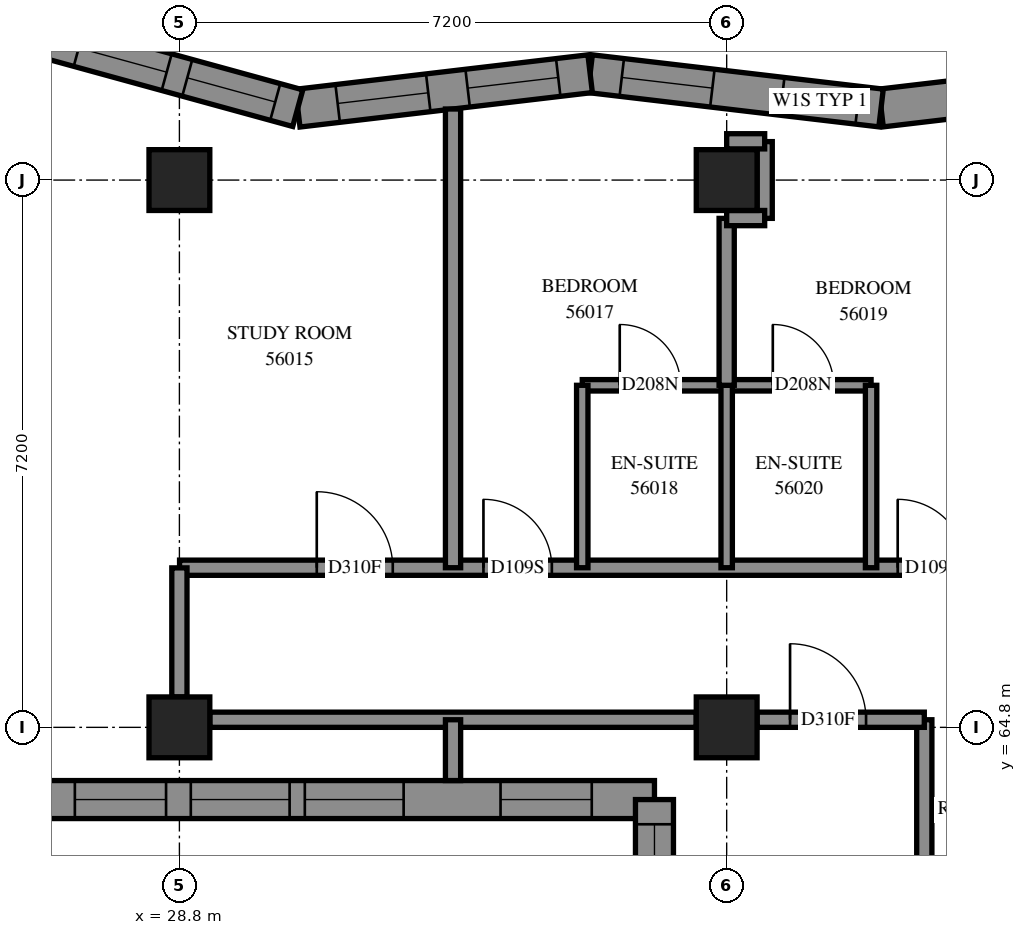
"""IFC4 building model, lengths in metres.
Left out: names, types, materials, properties, quantities, classifications, styles, units other than length and angle.
Written with IfcOpenShell. Run it as: python <this file> out.ifc"""

import sys

from ifc_helpers import new_model, si_unit, direction, frame, frame_2d, origin, origin_2d, place, context, subcontext, project, spatial, polyline, rectangle, outline, extrude, element, fill, save


model = new_model("IFC4")
c1 = context("Model", 3, precision=1e-05, world=origin(), true_north=direction((0.0, 1.0)))
c2 = subcontext(c1, "Body", "Model", "MODEL_VIEW")
j1 = project(units=[si_unit("LENGTHUNIT", "METRE"), si_unit("PLANEANGLEUNIT", "RADIAN")], contexts=[c1])
p1 = place(None, origin())
s1 = spatial("IfcSite", under=j1, at=p1, CompositionType="ELEMENT")
p2 = place(p1, origin())
s2 = spatial("IfcBuilding", under=s1, at=p2, CompositionType="ELEMENT")
p3 = place(p2, frame((0.0, 0.0, 206.6)))
s3 = spatial("IfcBuildingStorey", under=s2, at=p3, CompositionType="ELEMENT", Elevation=206.6)
for number, where, z_axis, x_axis in (
    (1, (28.8, 64.8, 0.0), (0.0, 0.0, 1.0), (1.0, 0.0, 0.0)),
    (2, (28.8, 72.0, 0.0), (0.0, 0.0, 1.0), (1.0, 0.0, 0.0)),
    (3, (36.0, 64.8, 0.0), (0.0, 0.0, 1.0), (1.0, 0.0, 0.0)),
    (4, (36.0, 72.0, 0.0), (0.0, 0.0, 1.0), (1.0, 0.0, 0.0)),
):
    element("IfcColumn", number, at=place(p3, frame(where, z_axis=z_axis, x_axis=x_axis)), inside=s3, PredefinedType="COLUMN", context=c2, shape_type="SweptSolid", body=[
        extrude(rectangle(XDim=0.8, YDim=0.8, at=origin_2d()), origin(), (0.0, 0.0, 1.0), 3.1),
    ])
p4 = place(p3, frame((41.859, 73.399, 0.0), z_axis=(0.0, 0.0, 1.0), x_axis=(-0.9931289789, -0.1170249176, 0.0)))
e5 = element("IfcWall", 5, at=p4, inside=s3, PredefinedType="SOLIDWALL", context=c2, shape_type="SweptSolid", body=[
    extrude(outline(polyline([(-0.029, -0.25), (3.824, -0.25), (3.883, 0.25), (0.029, 0.25), (-0.029, -0.25)])), origin(), (0.0, 0.0, 1.0), 3.1),
])
p5 = place(p4, frame((0.652, 0.0, 0.45)))
e6 = element("IfcOpeningElement", 6, at=p5, cuts=e5, PredefinedType="OPENING", context=c2, shape_type="SweptSolid", body=[
    extrude(rectangle(XDim=1.2, YDim=2.5, at=frame_2d((0.6, 1.25))), frame((0.0, 0.26, 0.0), z_axis=(0.0, -1.0, 0.0), x_axis=(1.0, 0.0, 0.0)), (0.0, 0.0, 1.0), 0.52),
])
p6 = place(p3, frame((38.031, 72.948, 0.0), z_axis=(0.0, 0.0, 1.0), x_axis=(-0.9931289789, 0.1170249176, 0.0)))
e7 = element("IfcWall", 7, at=p6, inside=s3, PredefinedType="SOLIDWALL", context=c2, shape_type="SweptSolid", body=[
    extrude(outline(polyline([(0.029, -0.25), (3.883, -0.25), (3.824, 0.25), (-0.029, 0.25), (0.029, -0.25)])), origin(), (0.0, 0.0, 1.0), 3.1),
])
p7 = place(p6, frame((2.235, 0.0, 0.45)))
e8 = element("IfcOpeningElement", 8, at=p7, cuts=e7, PredefinedType="OPENING", context=c2, shape_type="SweptSolid", body=[
    extrude(rectangle(XDim=1.2, YDim=2.5, at=frame_2d((0.6, 1.25))), frame((0.0, 0.26, 0.0), z_axis=(0.0, -1.0, 0.0), x_axis=(1.0, 0.0, 0.0)), (0.0, 0.0, 1.0), 0.52),
])
p8 = place(p6, frame((0.309, 0.0, 0.45)))
e9 = element("IfcOpeningElement", 9, at=p8, cuts=e7, PredefinedType="OPENING", context=c2, shape_type="SweptSolid", body=[
    extrude(rectangle(XDim=1.0, YDim=2.5, at=frame_2d((0.5, 1.25))), frame((0.0, 0.26, 0.0), z_axis=(0.0, -1.0, 0.0), x_axis=(1.0, 0.0, 0.0)), (0.0, 0.0, 1.0), 0.52),
])
p9 = place(p3, frame((34.204, 73.399, 0.0), z_axis=(0.0, 0.0, 1.0), x_axis=(-0.9931278513, -0.1170344863, 0.0)))
e10 = element("IfcWall", 10, at=p9, inside=s3, PredefinedType="SOLIDWALL", context=c2, shape_type="SweptSolid", body=[
    extrude(outline(polyline([(-0.029, -0.25), (3.824, -0.25), (3.922, 0.25), (0.029, 0.25), (-0.029, -0.25)])), origin(), (0.0, 0.0, 1.0), 3.1),
])
p10 = place(p9, frame((0.423, 0.0, 0.45)))
e11 = element("IfcOpeningElement", 11, at=p10, cuts=e10, PredefinedType="OPENING", context=c2, shape_type="SweptSolid", body=[
    extrude(rectangle(XDim=1.2, YDim=2.5, at=frame_2d((0.6, 1.25))), frame((0.0, 0.26, 0.0), z_axis=(0.0, -1.0, 0.0), x_axis=(1.0, 0.0, 0.0)), (0.0, 0.0, 1.0), 0.52),
])
p11 = place(p9, frame((2.145, 0.0, 0.45)))
e12 = element("IfcOpeningElement", 12, at=p11, cuts=e10, PredefinedType="OPENING", context=c2, shape_type="SweptSolid", body=[
    extrude(rectangle(XDim=1.2, YDim=2.5, at=frame_2d((0.6, 1.25))), frame((0.0, 0.26, 0.0), z_axis=(0.0, -1.0, 0.0), x_axis=(1.0, 0.0, 0.0)), (0.0, 0.0, 1.0), 0.52),
])
p12 = place(p3, frame((30.357, 72.946, 0.0), z_axis=(0.0, 0.0, 1.0), x_axis=(-0.9643026767, 0.2648024691, 0.0)))
e13 = element("IfcWall", 13, at=p12, inside=s3, PredefinedType="SOLIDWALL", context=c2, shape_type="SweptSolid", body=[
    extrude(outline(polyline([(0.049, -0.25), (4.018, -0.25), (3.362, 0.25), (-0.049, 0.25), (0.049, -0.25)])), origin(), (0.0, 0.0, 1.0), 3.1),
])
p13 = place(p12, frame((0.307, 0.0, 0.45)))
e14 = element("IfcOpeningElement", 14, at=p13, cuts=e13, PredefinedType="OPENING", context=c2, shape_type="SweptSolid", body=[
    extrude(rectangle(XDim=1.2, YDim=2.5, at=frame_2d((0.6, 1.25))), frame((0.0, 0.26, 0.0), z_axis=(0.0, -1.0, 0.0), x_axis=(1.0, 0.0, 0.0)), (0.0, 0.0, 1.0), 0.52),
])
p14 = place(p12, frame((1.788, 0.0, 0.45)))
e15 = element("IfcOpeningElement", 15, at=p14, cuts=e13, PredefinedType="OPENING", context=c2, shape_type="SweptSolid", body=[
    extrude(rectangle(XDim=1.2, YDim=2.5, at=frame_2d((0.6, 1.25))), frame((0.0, 0.26, 0.0), z_axis=(0.0, -1.0, 0.0), x_axis=(1.0, 0.0, 0.0)), (0.0, 0.0, 1.0), 0.52),
])
p15 = place(p3, frame((26.799, 63.85, 0.0), z_axis=(0.0, 0.0, 1.0), x_axis=(1.0, 0.0, 0.0)))
e16 = element("IfcWall", 16, at=p15, inside=s3, PredefinedType="SOLIDWALL", context=c2, shape_type="SweptSolid", body=[
    extrude(outline(polyline([(-0.25, -0.25), (8.001, -0.25), (8.501, 0.25), (0.25, 0.25), (-0.25, -0.25)])), origin(), (0.0, 0.0, 1.0), 3.1),
])
p16 = place(p15, frame((2.151, 0.0, 0.45)))
e17 = element("IfcOpeningElement", 17, at=p16, cuts=e16, PredefinedType="OPENING", context=c2, shape_type="SweptSolid", body=[
    extrude(rectangle(XDim=1.3, YDim=2.5, at=frame_2d((0.65, 1.25))), frame((0.0, 0.26, 0.0), z_axis=(0.0, -1.0, 0.0), x_axis=(1.0, 0.0, 0.0)), (0.0, 0.0, 1.0), 0.52),
])
p17 = place(p15, frame((3.651, 0.0, 0.45)))
e18 = element("IfcOpeningElement", 18, at=p17, cuts=e16, PredefinedType="OPENING", context=c2, shape_type="SweptSolid", body=[
    extrude(rectangle(XDim=1.3, YDim=2.5, at=frame_2d((0.65, 1.25))), frame((0.0, 0.26, 0.0), z_axis=(0.0, -1.0, 0.0), x_axis=(1.0, 0.0, 0.0)), (0.0, 0.0, 1.0), 0.52),
])
p18 = place(p15, frame((0.625, 0.0, 0.45)))
e19 = element("IfcOpeningElement", 19, at=p18, cuts=e16, PredefinedType="OPENING", context=c2, shape_type="SweptSolid", body=[
    extrude(rectangle(XDim=1.2, YDim=2.5, at=frame_2d((0.6, 1.25))), frame((0.0, 0.26, 0.0), z_axis=(0.0, -1.0, 0.0), x_axis=(1.0, 0.0, 0.0)), (0.0, 0.0, 1.0), 0.52),
])
p19 = place(p15, frame((6.226, 0.0, 0.45)))
e20 = element("IfcOpeningElement", 20, at=p19, cuts=e16, PredefinedType="OPENING", context=c2, shape_type="SweptSolid", body=[
    extrude(rectangle(XDim=1.2, YDim=2.5, at=frame_2d((0.6, 1.25))), frame((0.0, 0.26, 0.0), z_axis=(0.0, -1.0, 0.0), x_axis=(1.0, 0.0, 0.0)), (0.0, 0.0, 1.0), 0.52),
])
p20 = place(p3, frame((35.05, 63.85, 0.0), z_axis=(0.0, 0.0, 1.0), x_axis=(0.0, -1.0, 0.0)))
e21 = element("IfcWall", 21, at=p20, inside=s3, PredefinedType="SOLIDWALL", context=c2, shape_type="SweptSolid", body=[
    extrude(outline(polyline([(0.25, -0.25), (7.45, -0.25), (6.95, 0.25), (-0.25, 0.25), (0.25, -0.25)])), origin(), (0.0, 0.0, 1.0), 3.1),
])
p21 = place(p20, frame((2.2, 0.0, 0.45)))
e22 = element("IfcOpeningElement", 22, at=p21, cuts=e21, PredefinedType="OPENING", context=c2, shape_type="SweptSolid", body=[
    extrude(rectangle(XDim=1.3, YDim=2.5, at=frame_2d((0.65, 1.25))), frame((0.0, 0.26, 0.0), z_axis=(0.0, -1.0, 0.0), x_axis=(1.0, 0.0, 0.0)), (0.0, 0.0, 1.0), 0.52),
])
p22 = place(p20, frame((4.55, 0.0, 0.45)))
e23 = element("IfcOpeningElement", 23, at=p22, cuts=e21, PredefinedType="OPENING", context=c2, shape_type="SweptSolid", body=[
    extrude(rectangle(XDim=1.3, YDim=2.5, at=frame_2d((0.65, 1.25))), frame((0.0, 0.26, 0.0), z_axis=(0.0, -1.0, 0.0), x_axis=(1.0, 0.0, 0.0)), (0.0, 0.0, 1.0), 0.52),
])
p23 = place(p20, frame((0.325, 0.0, 0.45)))
e24 = element("IfcOpeningElement", 24, at=p23, cuts=e21, PredefinedType="OPENING", context=c2, shape_type="SweptSolid", body=[
    extrude(rectangle(XDim=1.2, YDim=2.5, at=frame_2d((0.6, 1.25))), frame((0.0, 0.26, 0.0), z_axis=(0.0, -1.0, 0.0), x_axis=(1.0, 0.0, 0.0)), (0.0, 0.0, 1.0), 0.52),
])
p24 = place(p3, frame((28.802, 66.9, 0.0), z_axis=(0.0, 0.0, 1.0), x_axis=(1.0, 0.0, 0.0)))
e25 = element("IfcWall", 25, at=p24, inside=s3, PredefinedType="PARTITIONING", context=c2, shape_type="SweptSolid", body=[
    extrude(rectangle(XDim=11.798, YDim=0.2, at=frame_2d((5.899, 0.0))), origin(), (0.0, 0.0, 1.0), 3.1),
])
p25 = place(p24, frame((1.805, 0.0, 0.0)))
e26 = element("IfcOpeningElement", 26, at=p25, cuts=e25, PredefinedType="OPENING", context=c2, shape_type="SweptSolid", body=[
    extrude(rectangle(XDim=1.0, YDim=2.1, at=frame_2d((0.5, 1.05))), frame((0.0, 0.11, 0.0), z_axis=(0.0, -1.0, 0.0), x_axis=(1.0, 0.0, 0.0)), (0.0, 0.0, 1.0), 0.22),
])
p26 = place(p24, frame((3.998, 0.0, 0.0)))
e27 = element("IfcOpeningElement", 27, at=p26, cuts=e25, PredefinedType="OPENING", context=c2, shape_type="SweptSolid", body=[
    extrude(rectangle(XDim=0.9, YDim=2.1, at=frame_2d((0.45, 1.05))), frame((0.0, 0.11, 0.0), z_axis=(0.0, -1.0, 0.0), x_axis=(1.0, 0.0, 0.0)), (0.0, 0.0, 1.0), 0.22),
])
p27 = place(p24, frame((9.448, 0.0, 0.0)))
e28 = element("IfcOpeningElement", 28, at=p27, cuts=e25, PredefinedType="OPENING", context=c2, shape_type="SweptSolid", body=[
    extrude(rectangle(XDim=0.9, YDim=2.1, at=frame_2d((0.45, 1.05))), frame((0.0, 0.11, 0.0), z_axis=(0.0, -1.0, 0.0), x_axis=(1.0, 0.0, 0.0)), (0.0, 0.0, 1.0), 0.22),
])
p28 = place(p3, frame((29.2, 64.9, 0.0), z_axis=(0.0, 0.0, 1.0), x_axis=(1.0, 0.0, 0.0)))
e29 = element("IfcWall", 29, at=p28, inside=s3, PredefinedType="PARTITIONING", context=c2, shape_type="SweptSolid", body=[
    extrude(rectangle(XDim=6.4, YDim=0.2, at=frame_2d((3.2, 0.0))), origin(), (0.0, 0.0, 1.0), 2.6),
])
p29 = place(p3, frame((32.4, 66.9, 0.0), z_axis=(0.0, 0.0, 1.0), x_axis=(0.0, 1.0, 0.0)))
e30 = element("IfcWall", 30, at=p29, inside=s3, PredefinedType="PARTITIONING", context=c2, shape_type="SweptSolid", body=[
    extrude(rectangle(XDim=6.035, YDim=0.2, at=frame_2d((3.018, 0.0))), origin(), (0.0, 0.0, 1.0), 3.1),
])
p30 = place(p3, frame((34.1, 69.3, 0.0), z_axis=(0.0, 0.0, 1.0), x_axis=(1.0, 0.0, 0.0)))
e31 = element("IfcWall", 31, at=p30, inside=s3, PredefinedType="PARTITIONING", context=c2, shape_type="SweptSolid", body=[
    extrude(rectangle(XDim=3.8, YDim=0.15, at=frame_2d((1.9, 0.0))), origin(), (0.0, 0.0, 1.0), 3.1),
])
p31 = place(p30, frame((0.493, 0.0, 0.0)))
e32 = element("IfcOpeningElement", 32, at=p31, cuts=e31, PredefinedType="OPENING", context=c2, shape_type="SweptSolid", body=[
    extrude(rectangle(XDim=0.8, YDim=2.1, at=frame_2d((0.4, 1.05))), frame((0.0, 0.085, 0.0), z_axis=(0.0, -1.0, 0.0), x_axis=(1.0, 0.0, 0.0)), (0.0, 0.0, 1.0), 0.17),
])
p32 = place(p30, frame((2.507, 0.0, 0.0)))
e33 = element("IfcOpeningElement", 33, at=p32, cuts=e31, PredefinedType="OPENING", context=c2, shape_type="SweptSolid", body=[
    extrude(rectangle(XDim=0.8, YDim=2.1, at=frame_2d((0.4, 1.05))), frame((0.0, 0.085, 0.0), z_axis=(0.0, -1.0, 0.0), x_axis=(1.0, 0.0, 0.0)), (0.0, 0.0, 1.0), 0.17),
])
p33 = place(p3, frame((38.6, 62.202, 0.0), z_axis=(0.0, 0.0, 1.0), x_axis=(0.0, 1.0, 0.0)))
e34 = element("IfcWall", 34, at=p33, inside=s3, PredefinedType="PARTITIONING", context=c2, shape_type="SweptSolid", body=[
    extrude(rectangle(XDim=2.698, YDim=0.2, at=frame_2d((1.349, 0.0))), origin(), (0.0, 0.0, 1.0), 3.1),
])
for number, where, z_axis, x_axis in (
    (35, (34.1, 66.9, 0.0), (0.0, 0.0, 1.0), (0.0, 1.0, 0.0)),
    (36, (36.0, 66.9, 0.0), (0.0, 0.0, 1.0), (0.0, 1.0, 0.0)),
    (37, (37.9, 66.9, 0.0), (0.0, 0.0, 1.0), (0.0, 1.0, 0.0)),
):
    element("IfcWall", number, at=place(p3, frame(where, z_axis=z_axis, x_axis=x_axis)), inside=s3, PredefinedType="PARTITIONING", context=c2, shape_type="SweptSolid", body=[
        extrude(rectangle(XDim=2.4, YDim=0.15, at=frame_2d((1.2, 0.0))), origin(), (0.0, 0.0, 1.0), 3.1),
    ])
p34 = place(p3, frame((36.4, 64.9, 0.0), z_axis=(0.0, 0.0, 1.0), x_axis=(1.0, 0.0, 0.0)))
e38 = element("IfcWall", 38, at=p34, inside=s3, PredefinedType="PARTITIONING", context=c2, shape_type="SweptSolid", body=[
    extrude(rectangle(XDim=2.2, YDim=0.2, at=frame_2d((1.1, 0.0))), origin(), (0.0, 0.0, 1.0), 3.1),
])
p35 = place(p34, frame((0.434, 0.0, 0.0)))
e39 = element("IfcOpeningElement", 39, at=p35, cuts=e38, PredefinedType="OPENING", context=c2, shape_type="SweptSolid", body=[
    extrude(rectangle(XDim=1.0, YDim=2.1, at=frame_2d((0.5, 1.05))), frame((0.0, 0.11, 0.0), z_axis=(0.0, -1.0, 0.0), x_axis=(1.0, 0.0, 0.0)), (0.0, 0.0, 1.0), 0.22),
])
p36 = place(p3, frame((36.0, 69.3, 0.0), z_axis=(0.0, 0.0, 1.0), x_axis=(0.0, 1.0, 0.0)))
e40 = element("IfcWall", 40, at=p36, inside=s3, PredefinedType="PARTITIONING", context=c2, shape_type="SweptSolid", body=[
    extrude(rectangle(XDim=2.196, YDim=0.2, at=frame_2d((1.098, 0.0))), origin(), (0.0, 0.0, 1.0), 3.1),
])
p37 = place(p3, frame((28.8, 65.2, 0.0), z_axis=(0.0, 0.0, 1.0), x_axis=(0.0, 1.0, 0.0)))
e41 = element("IfcWall", 41, at=p37, inside=s3, PredefinedType="PARTITIONING", context=c2, shape_type="SweptSolid", body=[
    extrude(rectangle(XDim=1.698, YDim=0.2, at=frame_2d((0.849, 0.0))), origin(), (0.0, 0.0, 1.0), 2.6),
])
p38 = place(p3, frame((36.5, 71.496, 0.0), z_axis=(0.0, 0.0, 1.0), x_axis=(0.0, 1.0, 0.0)))
e42 = element("IfcWall", 42, at=p38, inside=s3, PredefinedType="PARTITIONING", context=c2, shape_type="SweptSolid", body=[
    extrude(rectangle(XDim=1.01, YDim=0.2, at=frame_2d((0.505, 0.0))), origin(), (0.0, 0.0, 1.0), 3.1),
])
p39 = place(p3, frame((32.4, 64.1, 0.0), z_axis=(0.0, 0.0, 1.0), x_axis=(0.0, 1.0, 0.0)))
e43 = element("IfcWall", 43, at=p39, inside=s3, PredefinedType="PARTITIONING", context=c2, shape_type="SweptSolid", body=[
    extrude(rectangle(XDim=0.8, YDim=0.2, at=frame_2d((0.4, 0.0))), origin(), (0.0, 0.0, 1.0), 3.1),
])
for number, where, z_axis, x_axis in (
    (44, (36.0, 72.51, 0.0), (0.0, 0.0, 1.0), (1.0, 0.0, 0.0)),
    (45, (36.0, 71.5, 0.0), (0.0, 0.0, 1.0), (1.0, 0.0, 0.0)),
):
    element("IfcWall", number, at=place(p3, frame(where, z_axis=z_axis, x_axis=x_axis)), inside=s3, PredefinedType="PARTITIONING", context=c2, shape_type="SweptSolid", body=[
        extrude(rectangle(XDim=0.5, YDim=0.2, at=frame_2d((0.25, 0.0))), origin(), (0.0, 0.0, 1.0), 3.1),
    ])
p40 = place(p7, origin())
e46 = element("IfcWindow", 46, at=p40, inside=s3, PartitioningType="SINGLE_PANEL", PredefinedType="WINDOW", context=c2, shape_type="SweptSolid", body=[
    extrude(rectangle(XDim=1.2, YDim=2.5, at=frame_2d((0.6, 1.25))), frame((0.0, 0.18, 0.0), z_axis=(0.0, -1.0, 0.0), x_axis=(1.0, 0.0, 0.0)), (0.0, 0.0, 1.0), 0.06),
])
fill(e8, e46)
p41 = place(p10, origin())
e47 = element("IfcWindow", 47, at=p41, inside=s3, PartitioningType="SINGLE_PANEL", PredefinedType="WINDOW", context=c2, shape_type="SweptSolid", body=[
    extrude(rectangle(XDim=1.2, YDim=2.5, at=frame_2d((0.6, 1.25))), frame((0.0, 0.18, 0.0), z_axis=(0.0, -1.0, 0.0), x_axis=(1.0, 0.0, 0.0)), (0.0, 0.0, 1.0), 0.06),
])
fill(e11, e47)
p42 = place(p11, origin())
e48 = element("IfcWindow", 48, at=p42, inside=s3, PartitioningType="SINGLE_PANEL", PredefinedType="WINDOW", context=c2, shape_type="SweptSolid", body=[
    extrude(rectangle(XDim=1.2, YDim=2.5, at=frame_2d((0.6, 1.25))), frame((0.0, 0.18, 0.0), z_axis=(0.0, -1.0, 0.0), x_axis=(1.0, 0.0, 0.0)), (0.0, 0.0, 1.0), 0.06),
])
fill(e12, e48)
p43 = place(p13, origin())
e49 = element("IfcWindow", 49, at=p43, inside=s3, PartitioningType="SINGLE_PANEL", PredefinedType="WINDOW", context=c2, shape_type="SweptSolid", body=[
    extrude(rectangle(XDim=1.2, YDim=2.5, at=frame_2d((0.6, 1.25))), frame((0.0, 0.18, 0.0), z_axis=(0.0, -1.0, 0.0), x_axis=(1.0, 0.0, 0.0)), (0.0, 0.0, 1.0), 0.06),
])
fill(e14, e49)
p44 = place(p14, origin())
e50 = element("IfcWindow", 50, at=p44, inside=s3, PartitioningType="SINGLE_PANEL", PredefinedType="WINDOW", context=c2, shape_type="SweptSolid", body=[
    extrude(rectangle(XDim=1.2, YDim=2.5, at=frame_2d((0.6, 1.25))), frame((0.0, 0.18, 0.0), z_axis=(0.0, -1.0, 0.0), x_axis=(1.0, 0.0, 0.0)), (0.0, 0.0, 1.0), 0.06),
])
fill(e15, e50)
p45 = place(p16, origin())
e51 = element("IfcWindow", 51, at=p45, inside=s3, PartitioningType="SINGLE_PANEL", PredefinedType="WINDOW", context=c2, shape_type="SweptSolid", body=[
    extrude(rectangle(XDim=1.3, YDim=2.5, at=frame_2d((0.65, 1.25))), frame((0.0, 0.18, 0.0), z_axis=(0.0, -1.0, 0.0), x_axis=(1.0, 0.0, 0.0)), (0.0, 0.0, 1.0), 0.06),
])
fill(e17, e51)
p46 = place(p17, origin())
e52 = element("IfcWindow", 52, at=p46, inside=s3, PartitioningType="SINGLE_PANEL", PredefinedType="WINDOW", context=c2, shape_type="SweptSolid", body=[
    extrude(rectangle(XDim=1.3, YDim=2.5, at=frame_2d((0.65, 1.25))), frame((0.0, 0.18, 0.0), z_axis=(0.0, -1.0, 0.0), x_axis=(1.0, 0.0, 0.0)), (0.0, 0.0, 1.0), 0.06),
])
fill(e18, e52)
p47 = place(p18, origin())
e53 = element("IfcWindow", 53, at=p47, inside=s3, PartitioningType="SINGLE_PANEL", PredefinedType="WINDOW", context=c2, shape_type="SweptSolid", body=[
    extrude(rectangle(XDim=1.2, YDim=2.5, at=frame_2d((0.6, 1.25))), frame((0.0, 0.18, 0.0), z_axis=(0.0, -1.0, 0.0), x_axis=(1.0, 0.0, 0.0)), (0.0, 0.0, 1.0), 0.06),
])
fill(e19, e53)
p48 = place(p19, origin())
e54 = element("IfcWindow", 54, at=p48, inside=s3, PartitioningType="SINGLE_PANEL", PredefinedType="WINDOW", context=c2, shape_type="SweptSolid", body=[
    extrude(rectangle(XDim=1.2, YDim=2.5, at=frame_2d((0.6, 1.25))), frame((0.0, 0.18, 0.0), z_axis=(0.0, -1.0, 0.0), x_axis=(1.0, 0.0, 0.0)), (0.0, 0.0, 1.0), 0.06),
])
fill(e20, e54)
p49 = place(p23, origin())
e55 = element("IfcWindow", 55, at=p49, inside=s3, PartitioningType="SINGLE_PANEL", PredefinedType="WINDOW", context=c2, shape_type="SweptSolid", body=[
    extrude(rectangle(XDim=1.2, YDim=2.5, at=frame_2d((0.6, 1.25))), frame((0.0, 0.18, 0.0), z_axis=(0.0, -1.0, 0.0), x_axis=(1.0, 0.0, 0.0)), (0.0, 0.0, 1.0), 0.06),
])
fill(e24, e55)
p50 = place(p25, origin())
e56 = element("IfcDoor", 56, at=p50, inside=s3, OperationType="SINGLE_SWING_RIGHT", PredefinedType="DOOR", context=c2, shape_type="SweptSolid", body=[
    extrude(rectangle(XDim=1.0, YDim=2.1, at=frame_2d((0.5, 1.05))), frame((0.0, 0.025, 0.0), z_axis=(0.0, -1.0, 0.0), x_axis=(1.0, 0.0, 0.0)), (0.0, 0.0, 1.0), 0.05),
])
fill(e26, e56)
p51 = place(p35, origin())
e57 = element("IfcDoor", 57, at=p51, inside=s3, OperationType="SINGLE_SWING_RIGHT", PredefinedType="DOOR", context=c2, shape_type="SweptSolid", body=[
    extrude(rectangle(XDim=1.0, YDim=2.1, at=frame_2d((0.5, 1.05))), frame((0.0, 0.025, 0.0), z_axis=(0.0, -1.0, 0.0), x_axis=(1.0, 0.0, 0.0)), (0.0, 0.0, 1.0), 0.05),
])
fill(e39, e57)
p52 = place(p26, origin())
e58 = element("IfcDoor", 58, at=p52, inside=s3, OperationType="SINGLE_SWING_LEFT", PredefinedType="DOOR", context=c2, shape_type="SweptSolid", body=[
    extrude(rectangle(XDim=0.9, YDim=2.1, at=frame_2d((0.45, 1.05))), frame((0.0, 0.025, 0.0), z_axis=(0.0, -1.0, 0.0), x_axis=(1.0, 0.0, 0.0)), (0.0, 0.0, 1.0), 0.05),
])
fill(e27, e58)
p53 = place(p31, origin())
e59 = element("IfcDoor", 59, at=p53, inside=s3, OperationType="SINGLE_SWING_RIGHT", PredefinedType="DOOR", context=c2, shape_type="SweptSolid", body=[
    extrude(rectangle(XDim=0.8, YDim=2.1, at=frame_2d((0.4, 1.05))), frame((0.0, 0.025, 0.0), z_axis=(0.0, -1.0, 0.0), x_axis=(1.0, 0.0, 0.0)), (0.0, 0.0, 1.0), 0.05),
])
fill(e32, e59)
p54 = place(p27, origin())
e60 = element("IfcDoor", 60, at=p54, inside=s3, OperationType="SINGLE_SWING_RIGHT", PredefinedType="DOOR", context=c2, shape_type="SweptSolid", body=[
    extrude(rectangle(XDim=0.9, YDim=2.1, at=frame_2d((0.45, 1.05))), frame((0.0, 0.025, 0.0), z_axis=(0.0, -1.0, 0.0), x_axis=(1.0, 0.0, 0.0)), (0.0, 0.0, 1.0), 0.05),
])
fill(e28, e60)
p55 = place(p32, origin())
e61 = element("IfcDoor", 61, at=p55, inside=s3, OperationType="SINGLE_SWING_RIGHT", PredefinedType="DOOR", context=c2, shape_type="SweptSolid", body=[
    extrude(rectangle(XDim=0.8, YDim=2.1, at=frame_2d((0.4, 1.05))), frame((0.0, 0.025, 0.0), z_axis=(0.0, -1.0, 0.0), x_axis=(1.0, 0.0, 0.0)), (0.0, 0.0, 1.0), 0.05),
])
fill(e33, e61)
p56 = place(p8, origin())
e62 = element("IfcWindow", 62, at=p56, inside=s3, PartitioningType="SINGLE_PANEL", PredefinedType="WINDOW", context=c2, shape_type="SweptSolid", body=[
    extrude(rectangle(XDim=1.0, YDim=2.5, at=frame_2d((0.5, 1.25))), frame((0.0, 0.18, 0.0), z_axis=(0.0, -1.0, 0.0), x_axis=(1.0, 0.0, 0.0)), (0.0, 0.0, 1.0), 0.06),
])
fill(e9, e62)
save(model, sys.argv[1])
